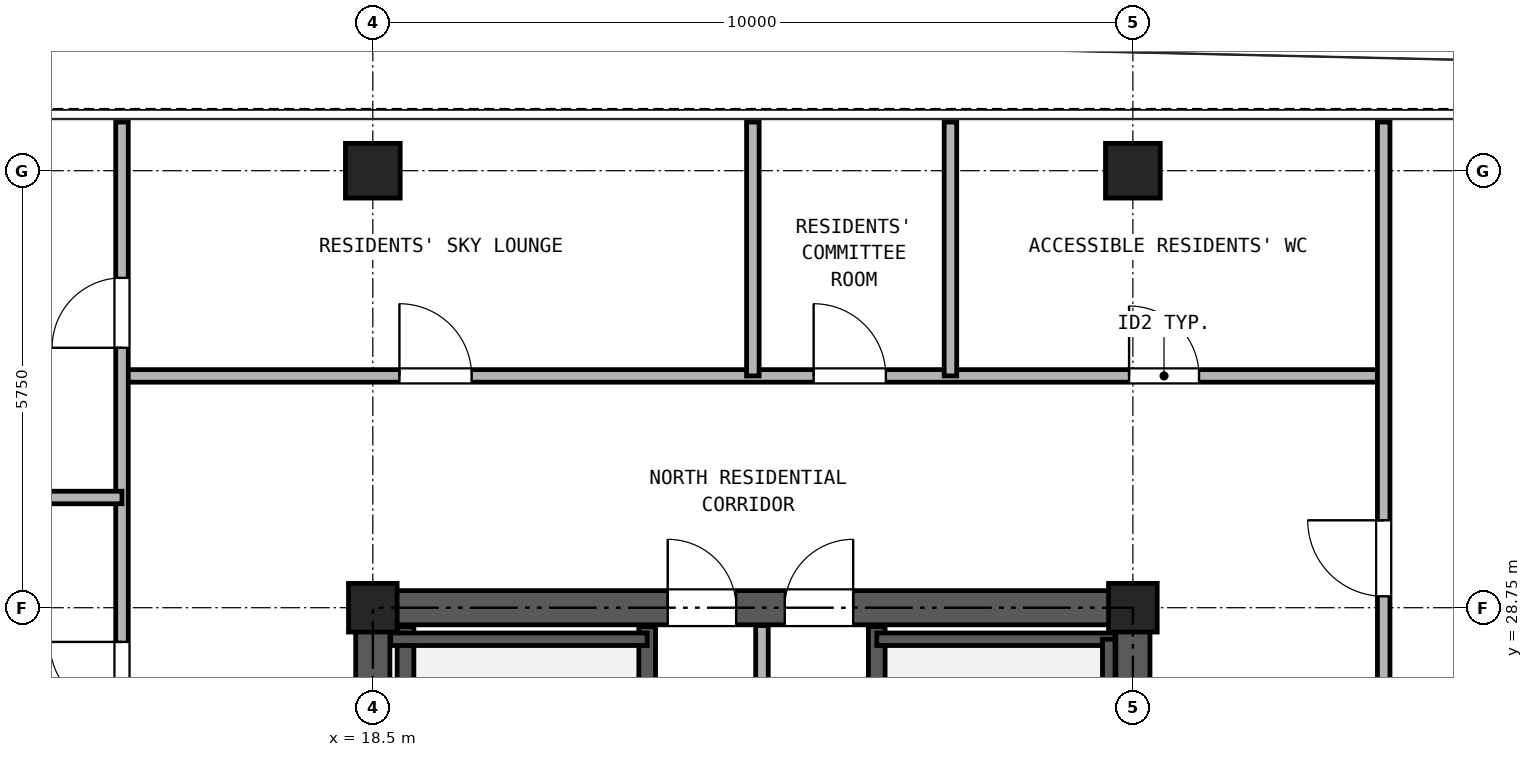
"""IFC4 building model, lengths in metres.
Left out: names, types, materials, properties, quantities, classifications, styles, units other than length and angle.
Written with IfcOpenShell. Run it as: python <this file> out.ifc"""

import sys

from ifc_helpers import new_model, si_unit, direction, frame, frame_2d, origin, origin_2d, place, context, subcontext, project, spatial, rectangle, hollow_rectangle, extrude, source, transform, mapped, element, fill, save


model = new_model("IFC4")
c1 = context("Model", 3, precision=1e-05, world=origin(), true_north=direction((0.0, 1.0)))
c2 = subcontext(c1, "Body", "Model", "MODEL_VIEW")
j1 = project(units=[si_unit("LENGTHUNIT", "METRE"), si_unit("PLANEANGLEUNIT", "RADIAN")], contexts=[c1])
p1 = place(None, origin())
s1 = spatial("IfcSite", under=j1, at=p1, CompositionType="ELEMENT")
p2 = place(p1, origin())
s2 = spatial("IfcBuilding", under=s1, at=p2, CompositionType="ELEMENT")
p3 = place(p2, frame((0.0, 0.0, 162.5)))
s3 = spatial("IfcBuildingStorey", under=s2, at=p3, CompositionType="ELEMENT", Elevation=162.5)
m1 = source(origin(), c2, "Body", "SweptSolid", [
    extrude(hollow_rectangle(XDim=0.72, YDim=0.72, WallThickness=0.04, at=origin_2d()), origin(), (0.0, 0.0, 1.0), 2.95),
])
for number, where, z_axis, x_axis in (
    (1, (18.5, 34.5, 0.0), (0.0, 0.0, 1.0), (1.0, 0.0, 0.0)),
    (2, (28.5, 34.5, 0.0), (0.0, 0.0, 1.0), (1.0, 0.0, 0.0)),
):
    element("IfcColumn", number, at=place(p3, frame(where, z_axis=z_axis, x_axis=x_axis)), inside=s3, PredefinedType="COLUMN", context=c2, shape_type="MappedRepresentation", body=[
        mapped(m1, transform((0.0, 0.0, 0.0), x_axis=(1.0, 0.0, 0.0), y_axis=(0.0, 1.0, 0.0), z_axis=(0.0, 0.0, 1.0), scale=1.0)),
    ])
m2 = source(origin(), c2, "Body", "SweptSolid", [
    extrude(hollow_rectangle(XDim=0.64, YDim=0.64, WallThickness=0.035, at=origin_2d()), origin(), (0.0, 0.0, 1.0), 2.95),
])
for number, where, z_axis, x_axis in (
    (3, (18.5, 28.75, 0.0), (0.0, 0.0, 1.0), (1.0, 0.0, 0.0)),
    (4, (28.5, 28.75, 0.0), (0.0, 0.0, 1.0), (1.0, 0.0, 0.0)),
):
    element("IfcColumn", number, at=place(p3, frame(where, z_axis=z_axis, x_axis=x_axis)), inside=s3, PredefinedType="COLUMN", context=c2, shape_type="MappedRepresentation", body=[
        mapped(m2, transform((0.0, 0.0, 0.0), x_axis=(1.0, 0.0, 0.0), y_axis=(0.0, 1.0, 0.0), z_axis=(0.0, 0.0, 1.0), scale=1.0)),
    ])
p4 = place(p3, frame((18.275, 28.75, 0.0), z_axis=(0.0, 0.0, 1.0), x_axis=(1.0, 0.0, 0.0)))
e5 = element("IfcWall", 5, at=p4, inside=s3, PredefinedType="SHEAR", context=c2, shape_type="SweptSolid", body=[
    extrude(rectangle(XDim=10.45, YDim=0.45, at=frame_2d((5.225, 0.0))), origin(), (0.0, 0.0, 1.0), 2.95),
])
p5 = place(p4, frame((4.105, 0.0, 0.0)))
e6 = element("IfcOpeningElement", 6, at=p5, cuts=e5, PredefinedType="OPENING", context=c2, shape_type="SweptSolid", body=[
    extrude(rectangle(XDim=0.9, YDim=2.05, at=frame_2d((0.45, 1.025))), frame((0.0, 0.235, 0.0), z_axis=(0.0, -1.0, 0.0), x_axis=(1.0, 0.0, 0.0)), (0.0, 0.0, 1.0), 0.47),
])
p6 = place(p4, frame((5.645, 0.0, 0.0)))
e7 = element("IfcOpeningElement", 7, at=p6, cuts=e5, PredefinedType="OPENING", context=c2, shape_type="SweptSolid", body=[
    extrude(rectangle(XDim=0.9, YDim=2.05, at=frame_2d((0.45, 1.025))), frame((0.0, 0.235, 0.0), z_axis=(0.0, -1.0, 0.0), x_axis=(1.0, 0.0, 0.0)), (0.0, 0.0, 1.0), 0.47),
])
p7 = place(p3, frame((18.5, 11.725, 0.0), z_axis=(0.0, 0.0, 1.0), x_axis=(0.0, 1.0, 0.0)))
e8 = element("IfcWall", 8, at=p7, inside=s3, PredefinedType="SHEAR", context=c2, shape_type="SweptSolid", body=[
    extrude(rectangle(XDim=16.8, YDim=0.45, at=frame_2d((8.4, 0.0))), origin(), (0.0, 0.0, 1.0), 2.95),
])
p8 = place(p7, frame((7.425, 0.0, 0.0)))
e9 = element("IfcOpeningElement", 9, at=p8, cuts=e8, PredefinedType="OPENING", context=c2, shape_type="SweptSolid", body=[
    extrude(rectangle(XDim=1.15, YDim=2.2, at=frame_2d((0.575, 1.1))), frame((0.0, 0.235, 0.0), z_axis=(0.0, -1.0, 0.0), x_axis=(1.0, 0.0, 0.0)), (0.0, 0.0, 1.0), 0.47),
])
p9 = place(p3, frame((28.5, 11.725, 0.0), z_axis=(0.0, 0.0, 1.0), x_axis=(0.0, 1.0, 0.0)))
e10 = element("IfcWall", 10, at=p9, inside=s3, PredefinedType="SHEAR", context=c2, shape_type="SweptSolid", body=[
    extrude(rectangle(XDim=16.8, YDim=0.45, at=frame_2d((8.4, 0.0))), origin(), (0.0, 0.0, 1.0), 2.95),
])
p10 = place(p9, frame((7.425, 0.0, 0.0)))
e11 = element("IfcOpeningElement", 11, at=p10, cuts=e10, PredefinedType="OPENING", context=c2, shape_type="SweptSolid", body=[
    extrude(rectangle(XDim=1.15, YDim=2.2, at=frame_2d((0.575, 1.1))), frame((0.0, 0.235, 0.0), z_axis=(0.0, -1.0, 0.0), x_axis=(1.0, 0.0, 0.0)), (0.0, 0.0, 1.0), 0.47),
])
for number, where, z_axis, x_axis in (
    (12, (18.93, 21.39, 0.0), (0.0, 0.0, 1.0), (0.0, 1.0, 0.0)),
    (13, (22.11, 21.39, 0.0), (0.0, 0.0, 1.0), (0.0, 1.0, 0.0)),
    (14, (25.13, 21.39, 0.0), (0.0, 0.0, 1.0), (0.0, 1.0, 0.0)),
):
    element("IfcWall", number, at=place(p3, frame(where, z_axis=z_axis, x_axis=x_axis)), inside=s3, PredefinedType="SOLIDWALL", context=c2, shape_type="SweptSolid", body=[
        extrude(rectangle(XDim=7.11, YDim=0.22, at=frame_2d((3.555, 0.0))), origin(), (0.0, 0.0, 1.0), 2.95),
    ])
p11 = place(p3, frame((18.735, 28.335, 0.0), z_axis=(0.0, 0.0, 1.0), x_axis=(1.0, 0.0, 0.0)))
e15 = element("IfcWall", 15, at=p11, inside=s3, PredefinedType="PARTITIONING", context=c2, shape_type="SweptSolid", body=[
    extrude(rectangle(XDim=3.375, YDim=0.165, at=frame_2d((1.688, 0.0))), origin(), (0.0, 0.0, 1.0), 2.95),
])
p12 = place(p3, frame((25.13, 28.335, 0.0), z_axis=(0.0, 0.0, 1.0), x_axis=(1.0, 0.0, 0.0)))
e16 = element("IfcWall", 16, at=p12, inside=s3, PredefinedType="PARTITIONING", context=c2, shape_type="SweptSolid", body=[
    extrude(rectangle(XDim=3.135, YDim=0.165, at=frame_2d((1.567, 0.0))), origin(), (0.0, 0.0, 1.0), 2.95),
])
p13 = place(p3, frame((28.183, 21.39, 0.0), z_axis=(0.0, 0.0, 1.0), x_axis=(0.0, 1.0, 0.0)))
e17 = element("IfcWall", 17, at=p13, inside=s3, PredefinedType="PARTITIONING", context=c2, shape_type="SweptSolid", body=[
    extrude(rectangle(XDim=6.945, YDim=0.165, at=frame_2d((3.473, 0.0))), origin(), (0.0, 0.0, 1.0), 2.95),
])
p14 = place(p3, frame((23.62, 24.4, 0.0), z_axis=(0.0, 0.0, 1.0), x_axis=(0.0, 1.0, 0.0)))
e18 = element("IfcWall", 18, at=p14, inside=s3, PredefinedType="PARTITIONING", context=c2, shape_type="SweptSolid", body=[
    extrude(rectangle(XDim=4.115, YDim=0.165, at=frame_2d((2.058, 0.0))), origin(), (0.0, 0.0, 1.0), 2.95),
])
p15 = place(p3, frame((15.2, 31.8, 0.0), z_axis=(0.0, 0.0, 1.0), x_axis=(1.0, 0.0, 0.0)))
e19 = element("IfcWall", 19, at=p15, inside=s3, PredefinedType="PARTITIONING", context=c2, shape_type="SweptSolid", body=[
    extrude(rectangle(XDim=16.6, YDim=0.165, at=frame_2d((8.3, 0.0))), origin(), (0.0, 0.0, 1.0), 2.583),
])
p16 = place(p15, frame((3.65, 0.0, 0.0)))
e20 = element("IfcOpeningElement", 20, at=p16, cuts=e19, PredefinedType="OPENING", context=c2, shape_type="SweptSolid", body=[
    extrude(rectangle(XDim=0.95, YDim=2.15, at=frame_2d((0.475, 1.075))), frame((0.0, 0.093, 0.0), z_axis=(0.0, -1.0, 0.0), x_axis=(1.0, 0.0, 0.0)), (0.0, 0.0, 1.0), 0.185),
])
p17 = place(p15, frame((9.1, 0.0, 0.0)))
e21 = element("IfcOpeningElement", 21, at=p17, cuts=e19, PredefinedType="OPENING", context=c2, shape_type="SweptSolid", body=[
    extrude(rectangle(XDim=0.95, YDim=2.15, at=frame_2d((0.475, 1.075))), frame((0.0, 0.093, 0.0), z_axis=(0.0, -1.0, 0.0), x_axis=(1.0, 0.0, 0.0)), (0.0, 0.0, 1.0), 0.185),
])
p18 = place(p15, frame((13.25, 0.0, 0.0)))
e22 = element("IfcOpeningElement", 22, at=p18, cuts=e19, PredefinedType="OPENING", context=c2, shape_type="SweptSolid", body=[
    extrude(rectangle(XDim=0.92, YDim=2.1, at=frame_2d((0.46, 1.05))), frame((0.0, 0.093, 0.0), z_axis=(0.0, -1.0, 0.0), x_axis=(1.0, 0.0, 0.0)), (0.0, 0.0, 1.0), 0.185),
])
p19 = place(p3, frame((15.2, 10.65, 0.0), z_axis=(0.0, 0.0, 1.0), x_axis=(0.0, 1.0, 0.0)))
e23 = element("IfcWall", 23, at=p19, inside=s3, PredefinedType="PARTITIONING", context=c2, shape_type="SweptSolid", body=[
    extrude(rectangle(XDim=24.49, YDim=0.165, at=frame_2d((12.245, 0.0))), origin(), (0.0, 0.0, 1.0), 2.95),
])
p20 = place(p19, frame((3.425, 0.0, 0.0)))
e24 = element("IfcOpeningElement", 24, at=p20, cuts=e23, PredefinedType="OPENING", context=c2, shape_type="SweptSolid", body=[
    extrude(rectangle(XDim=0.95, YDim=2.15, at=frame_2d((0.475, 1.075))), frame((0.0, 0.093, 0.0), z_axis=(0.0, -1.0, 0.0), x_axis=(1.0, 0.0, 0.0)), (0.0, 0.0, 1.0), 0.185),
])
p21 = place(p19, frame((10.85, 0.0, 0.0)))
e25 = element("IfcOpeningElement", 25, at=p21, cuts=e23, PredefinedType="OPENING", context=c2, shape_type="SweptSolid", body=[
    extrude(rectangle(XDim=0.95, YDim=2.15, at=frame_2d((0.475, 1.075))), frame((0.0, 0.093, 0.0), z_axis=(0.0, -1.0, 0.0), x_axis=(1.0, 0.0, 0.0)), (0.0, 0.0, 1.0), 0.185),
])
p22 = place(p19, frame((16.7, 0.0, 0.0)))
e26 = element("IfcOpeningElement", 26, at=p22, cuts=e23, PredefinedType="OPENING", context=c2, shape_type="SweptSolid", body=[
    extrude(rectangle(XDim=0.95, YDim=2.15, at=frame_2d((0.475, 1.075))), frame((0.0, 0.093, 0.0), z_axis=(0.0, -1.0, 0.0), x_axis=(1.0, 0.0, 0.0)), (0.0, 0.0, 1.0), 0.185),
])
p23 = place(p19, frame((21.52, 0.0, 0.0)))
e27 = element("IfcOpeningElement", 27, at=p23, cuts=e23, PredefinedType="OPENING", context=c2, shape_type="SweptSolid", body=[
    extrude(rectangle(XDim=0.92, YDim=2.1, at=frame_2d((0.46, 1.05))), frame((0.0, 0.093, 0.0), z_axis=(0.0, -1.0, 0.0), x_axis=(1.0, 0.0, 0.0)), (0.0, 0.0, 1.0), 0.185),
])
p24 = place(p3, frame((31.8, 10.65, 0.0), z_axis=(0.0, 0.0, 1.0), x_axis=(0.0, 1.0, 0.0)))
e28 = element("IfcWall", 28, at=p24, inside=s3, PredefinedType="PARTITIONING", context=c2, shape_type="SweptSolid", body=[
    extrude(rectangle(XDim=24.49, YDim=0.165, at=frame_2d((12.245, 0.0))), origin(), (0.0, 0.0, 1.0), 2.95),
])
p25 = place(p24, frame((3.425, 0.0, 0.0)))
e29 = element("IfcOpeningElement", 29, at=p25, cuts=e28, PredefinedType="OPENING", context=c2, shape_type="SweptSolid", body=[
    extrude(rectangle(XDim=1.0, YDim=2.15, at=frame_2d((0.5, 1.075))), frame((0.0, 0.093, 0.0), z_axis=(0.0, -1.0, 0.0), x_axis=(1.0, 0.0, 0.0)), (0.0, 0.0, 1.0), 0.185),
])
p26 = place(p24, frame((11.6, 0.0, 0.0)))
e30 = element("IfcOpeningElement", 30, at=p26, cuts=e28, PredefinedType="OPENING", context=c2, shape_type="SweptSolid", body=[
    extrude(rectangle(XDim=1.0, YDim=2.15, at=frame_2d((0.5, 1.075))), frame((0.0, 0.093, 0.0), z_axis=(0.0, -1.0, 0.0), x_axis=(1.0, 0.0, 0.0)), (0.0, 0.0, 1.0), 0.185),
])
p27 = place(p24, frame((18.25, 0.0, 0.0)))
e31 = element("IfcOpeningElement", 31, at=p27, cuts=e28, PredefinedType="OPENING", context=c2, shape_type="SweptSolid", body=[
    extrude(rectangle(XDim=1.0, YDim=2.15, at=frame_2d((0.5, 1.075))), frame((0.0, 0.093, 0.0), z_axis=(0.0, -1.0, 0.0), x_axis=(1.0, 0.0, 0.0)), (0.0, 0.0, 1.0), 0.185),
])
p28 = place(p3, frame((0.16, 30.2, 0.0), z_axis=(0.0, 0.0, 1.0), x_axis=(1.0, 0.0, 0.0)))
e32 = element("IfcWall", 32, at=p28, inside=s3, PredefinedType="PARTITIONING", context=c2, shape_type="SweptSolid", body=[
    extrude(rectangle(XDim=15.04, YDim=0.165, at=frame_2d((7.52, 0.0))), origin(), (0.0, 0.0, 1.0), 2.95),
])
for number, where, z_axis, x_axis in (
    (33, (23.5, 31.8, 0.0), (0.0, 0.0, 1.0), (0.0, 1.0, 0.0)),
    (34, (26.1, 31.8, 0.0), (0.0, 0.0, 1.0), (0.0, 1.0, 0.0)),
):
    element("IfcWall", number, at=place(p3, frame(where, z_axis=z_axis, x_axis=x_axis)), inside=s3, PredefinedType="PARTITIONING", context=c2, shape_type="SweptSolid", body=[
        extrude(rectangle(XDim=3.34, YDim=0.165, at=frame_2d((1.67, 0.0))), origin(), (0.0, 0.0, 1.0), 2.95),
    ])
p29 = place(p5, origin())
e35 = element("IfcDoor", 35, at=p29, inside=s3, OperationType="SINGLE_SWING_LEFT", PredefinedType="DOOR", context=c2, shape_type="SweptSolid", body=[
    extrude(rectangle(XDim=0.9, YDim=2.05, at=frame_2d((0.45, 1.025))), frame((0.0, 0.025, 0.0), z_axis=(0.0, -1.0, 0.0), x_axis=(1.0, 0.0, 0.0)), (0.0, 0.0, 1.0), 0.05),
])
fill(e6, e35)
p30 = place(p6, origin())
e36 = element("IfcDoor", 36, at=p30, inside=s3, OperationType="SINGLE_SWING_RIGHT", PredefinedType="DOOR", context=c2, shape_type="SweptSolid", body=[
    extrude(rectangle(XDim=0.9, YDim=2.05, at=frame_2d((0.45, 1.025))), frame((0.0, 0.025, 0.0), z_axis=(0.0, -1.0, 0.0), x_axis=(1.0, 0.0, 0.0)), (0.0, 0.0, 1.0), 0.05),
])
fill(e7, e36)
p31 = place(p22, frame((0.95, 0.0, 0.0), z_axis=(0.0, 0.0, 1.0), x_axis=(-1.0, 0.0, 0.0)))
e37 = element("IfcDoor", 37, at=p31, inside=s3, OperationType="SINGLE_SWING_RIGHT", PredefinedType="DOOR", context=c2, shape_type="SweptSolid", body=[
    extrude(rectangle(XDim=0.95, YDim=2.15, at=frame_2d((0.475, 1.075))), frame((0.0, 0.025, 0.0), z_axis=(0.0, -1.0, 0.0), x_axis=(1.0, 0.0, 0.0)), (0.0, 0.0, 1.0), 0.05),
])
fill(e26, e37)
p32 = place(p23, frame((0.92, 0.0, 0.0), z_axis=(0.0, 0.0, 1.0), x_axis=(-1.0, 0.0, 0.0)))
e38 = element("IfcDoor", 38, at=p32, inside=s3, OperationType="SINGLE_SWING_LEFT", PredefinedType="DOOR", context=c2, shape_type="SweptSolid", body=[
    extrude(rectangle(XDim=0.92, YDim=2.1, at=frame_2d((0.46, 1.05))), frame((0.0, 0.025, 0.0), z_axis=(0.0, -1.0, 0.0), x_axis=(1.0, 0.0, 0.0)), (0.0, 0.0, 1.0), 0.05),
])
fill(e27, e38)
p33 = place(p27, frame((1.0, 0.0, 0.0), z_axis=(0.0, 0.0, 1.0), x_axis=(-1.0, 0.0, 0.0)))
e39 = element("IfcDoor", 39, at=p33, inside=s3, OperationType="SINGLE_SWING_RIGHT", PredefinedType="DOOR", context=c2, shape_type="SweptSolid", body=[
    extrude(rectangle(XDim=1.0, YDim=2.15, at=frame_2d((0.5, 1.075))), frame((0.0, 0.025, 0.0), z_axis=(0.0, -1.0, 0.0), x_axis=(1.0, 0.0, 0.0)), (0.0, 0.0, 1.0), 0.05),
])
fill(e31, e39)
p34 = place(p16, origin())
e40 = element("IfcDoor", 40, at=p34, inside=s3, OperationType="SINGLE_SWING_LEFT", PredefinedType="DOOR", context=c2, shape_type="SweptSolid", body=[
    extrude(rectangle(XDim=0.95, YDim=2.15, at=frame_2d((0.475, 1.075))), frame((0.0, 0.025, 0.0), z_axis=(0.0, -1.0, 0.0), x_axis=(1.0, 0.0, 0.0)), (0.0, 0.0, 1.0), 0.05),
])
fill(e20, e40)
p35 = place(p17, origin())
e41 = element("IfcDoor", 41, at=p35, inside=s3, OperationType="SINGLE_SWING_LEFT", PredefinedType="DOOR", context=c2, shape_type="SweptSolid", body=[
    extrude(rectangle(XDim=0.95, YDim=2.15, at=frame_2d((0.475, 1.075))), frame((0.0, 0.025, 0.0), z_axis=(0.0, -1.0, 0.0), x_axis=(1.0, 0.0, 0.0)), (0.0, 0.0, 1.0), 0.05),
])
fill(e21, e41)
p36 = place(p18, origin())
e42 = element("IfcDoor", 42, at=p36, inside=s3, OperationType="SINGLE_SWING_LEFT", PredefinedType="DOOR", context=c2, shape_type="SweptSolid", body=[
    extrude(rectangle(XDim=0.92, YDim=2.1, at=frame_2d((0.46, 1.05))), frame((0.0, 0.025, 0.0), z_axis=(0.0, -1.0, 0.0), x_axis=(1.0, 0.0, 0.0)), (0.0, 0.0, 1.0), 0.05),
])
fill(e22, e42)
save(model, sys.argv[1])
